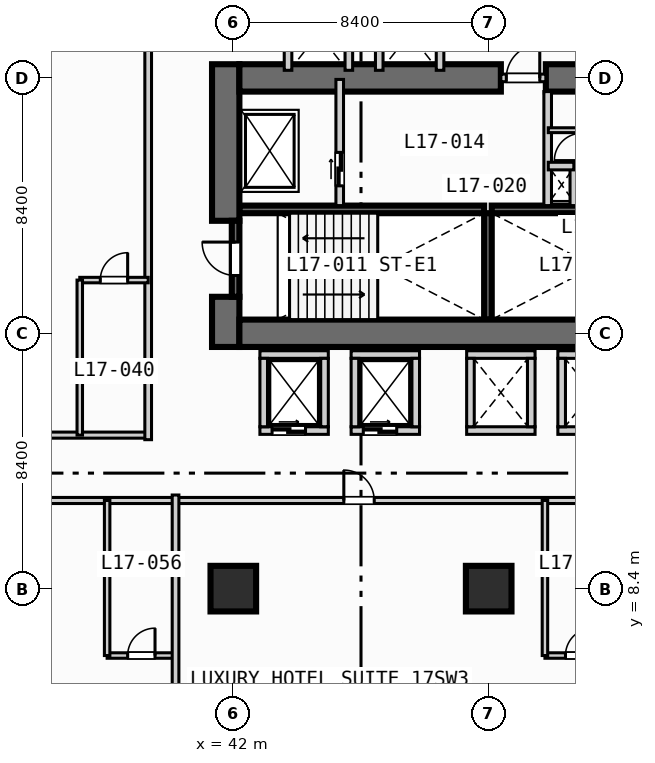
"""IFC4 building model, lengths in metres.
Left out: names, types, materials, properties, quantities, classifications, styles, units other than length and angle.
Written with IfcOpenShell. Run it as: python <this file> out.ifc"""

import sys

from ifc_helpers import new_model, si_unit, direction, frame, frame_2d, origin, origin_2d, place, context, subcontext, project, spatial, rectangle, extrude, element, fill, save


model = new_model("IFC4")
c1 = context("Model", 3, precision=1e-05, world=origin(), true_north=direction((0.0, 1.0)))
c2 = subcontext(c1, "Body", "Model", "MODEL_VIEW")
j1 = project(units=[si_unit("LENGTHUNIT", "METRE"), si_unit("PLANEANGLEUNIT", "RADIAN")], contexts=[c1])
p1 = place(None, origin())
s1 = spatial("IfcSite", under=j1, at=p1, CompositionType="ELEMENT")
p2 = place(p1, origin())
s2 = spatial("IfcBuilding", under=s1, at=p2, CompositionType="ELEMENT")
p3 = place(p2, frame((0.0, 0.0, 73.8)))
s3 = spatial("IfcBuildingStorey", under=s2, at=p3, CompositionType="ELEMENT", Elevation=73.8)
for number, where, z_axis, x_axis in (
    (1, (42.2, 20.875, 0.0), (0.0, 0.0, 1.0), (1.0, 0.0, 0.0)),
    (2, (50.5, 20.875, 0.0), (0.0, 0.0, 1.0), (1.0, 0.0, 0.0)),
):
    element("IfcWall", number, at=place(p3, frame(where, z_axis=z_axis, x_axis=x_axis)), inside=s3, PredefinedType="SOLIDWALL", context=c2, shape_type="SweptSolid", body=[
        extrude(rectangle(XDim=8.05, YDim=0.25, at=frame_2d((4.025, 0.0))), origin(), (0.0, 0.0, 1.0), 3.55),
    ])
p4 = place(p3, frame((50.375, 17.25, 0.0), z_axis=(0.0, 0.0, 1.0), x_axis=(0.0, 1.0, 0.0)))
e3 = element("IfcWall", 3, at=p4, inside=s3, PredefinedType="SOLIDWALL", context=c2, shape_type="SweptSolid", body=[
    extrude(rectangle(XDim=3.5, YDim=0.25, at=frame_2d((1.75, 0.0))), origin(), (0.0, 0.0, 1.0), 3.55),
])
p5 = place(p3, frame((41.75, 16.35, 0.0), z_axis=(0.0, 0.0, 1.0), x_axis=(0.0, 1.0, 0.0)))
e4 = element("IfcWall", 4, at=p5, inside=s3, PredefinedType="SHEAR", context=c2, shape_type="SweptSolid", body=[
    extrude(rectangle(XDim=1.65, YDim=0.9, at=frame_2d((0.825, 0.0))), origin(), (0.0, 0.0, 1.0), 3.55),
])
p6 = place(p3, frame((41.75, 20.5, 0.0), z_axis=(0.0, 0.0, 1.0), x_axis=(0.0, 1.0, 0.0)))
e5 = element("IfcWall", 5, at=p6, inside=s3, PredefinedType="SHEAR", context=c2, shape_type="SweptSolid", body=[
    extrude(rectangle(XDim=5.15, YDim=0.9, at=frame_2d((2.575, 0.0))), origin(), (0.0, 0.0, 1.0), 3.55),
])
p7 = place(p3, frame((42.2, 16.8, 0.0), z_axis=(0.0, 0.0, 1.0), x_axis=(1.0, 0.0, 0.0)))
e6 = element("IfcWall", 6, at=p7, inside=s3, PredefinedType="SHEAR", context=c2, shape_type="SweptSolid", body=[
    extrude(rectangle(XDim=16.35, YDim=0.9, at=frame_2d((8.175, 0.0))), origin(), (0.0, 0.0, 1.0), 3.55),
])
p8 = place(p3, frame((42.2, 25.2, 0.0), z_axis=(0.0, 0.0, 1.0), x_axis=(1.0, 0.0, 0.0)))
e7 = element("IfcWall", 7, at=p8, inside=s3, PredefinedType="SHEAR", context=c2, shape_type="SweptSolid", body=[
    extrude(rectangle(XDim=8.6, YDim=0.9, at=frame_2d((4.3, 0.0))), origin(), (0.0, 0.0, 1.0), 3.55),
])
p9 = place(p3, frame((52.28, 25.2, 0.0), z_axis=(0.0, 0.0, 1.0), x_axis=(1.0, 0.0, 0.0)))
e8 = element("IfcWall", 8, at=p9, inside=s3, PredefinedType="SHEAR", context=c2, shape_type="SweptSolid", body=[
    extrude(rectangle(XDim=1.27, YDim=0.9, at=frame_2d((0.635, 0.0))), origin(), (0.0, 0.0, 1.0), 3.55),
])
for number, where, z_axis, x_axis in (
    (9, (42.0, 8.4, 0.0), (0.0, 0.0, 1.0), (1.0, 0.0, 0.0)),
    (10, (50.4, 8.4, 0.0), (0.0, 0.0, 1.0), (1.0, 0.0, 0.0)),
):
    element("IfcColumn", number, at=place(p3, frame(where, z_axis=z_axis, x_axis=x_axis)), inside=s3, PredefinedType="COLUMN", context=c2, shape_type="SweptSolid", body=[
        extrude(rectangle(XDim=1.5, YDim=1.5, at=origin_2d()), origin(), (0.0, 0.0, 1.0), 3.8),
    ])
p10 = place(p3, frame((42.075, 18.0, 0.0), z_axis=(0.0, 0.0, 1.0), x_axis=(0.0, 1.0, 0.0)))
e11 = element("IfcWall", 11, at=p10, inside=s3, PredefinedType="SOLIDWALL", context=c2, shape_type="SweptSolid", body=[
    extrude(rectangle(XDim=2.5, YDim=0.25, at=frame_2d((1.25, 0.0))), origin(), (0.0, 0.0, 1.0), 3.55),
])
p11 = place(p10, frame((0.7, 0.0, 0.0)))
e12 = element("IfcOpeningElement", 12, at=p11, cuts=e11, PredefinedType="OPENING", context=c2, shape_type="SweptSolid", body=[
    extrude(rectangle(XDim=1.1, YDim=2.15, at=frame_2d((0.55, 1.075))), frame((0.0, 0.135, 0.0), z_axis=(0.0, -1.0, 0.0), x_axis=(1.0, 0.0, 0.0)), (0.0, 0.0, 1.0), 0.27),
])
p12 = place(p3, frame((45.5, 21.0, 0.0), z_axis=(0.0, 0.0, 1.0), x_axis=(0.0, 1.0, 0.0)))
e13 = element("IfcWall", 13, at=p12, inside=s3, PredefinedType="SOLIDWALL", context=c2, shape_type="SweptSolid", body=[
    extrude(rectangle(XDim=4.15, YDim=0.25, at=frame_2d((2.075, 0.0))), origin(), (0.0, 0.0, 1.0), 3.55),
])
p13 = place(p12, frame((0.65, 0.0, 0.0)))
e14 = element("IfcOpeningElement", 14, at=p13, cuts=e13, PredefinedType="OPENING", context=c2, shape_type="SweptSolid", body=[
    extrude(rectangle(XDim=1.1, YDim=2.15, at=frame_2d((0.55, 1.075))), frame((0.0, 0.135, 0.0), z_axis=(0.0, -1.0, 0.0), x_axis=(1.0, 0.0, 0.0)), (0.0, 0.0, 1.0), 0.27),
])
p14 = place(p3, frame((50.8, 25.2, 0.0), z_axis=(0.0, 0.0, 1.0), x_axis=(1.0, 0.0, 0.0)))
e15 = element("IfcWall", 15, at=p14, inside=s3, PredefinedType="SOLIDWALL", context=c2, shape_type="SweptSolid", body=[
    extrude(rectangle(XDim=1.48, YDim=0.25, at=frame_2d((0.74, 0.0))), origin(), (0.0, 0.0, 1.0), 3.55),
])
p15 = place(p14, frame((0.18, 0.0, 0.0)))
e16 = element("IfcOpeningElement", 16, at=p15, cuts=e15, PredefinedType="OPENING", context=c2, shape_type="SweptSolid", body=[
    extrude(rectangle(XDim=1.1, YDim=2.15, at=frame_2d((0.55, 1.075))), frame((0.0, 0.135, 0.0), z_axis=(0.0, -1.0, 0.0), x_axis=(1.0, 0.0, 0.0)), (0.0, 0.0, 1.0), 0.27),
])
p16 = place(p3, frame((52.34, 21.0, 0.0), z_axis=(0.0, 0.0, 1.0), x_axis=(0.0, 1.0, 0.0)))
e17 = element("IfcWall", 17, at=p16, inside=s3, PredefinedType="SOLIDWALL", context=c2, shape_type="SweptSolid", body=[
    extrude(rectangle(XDim=3.75, YDim=0.25, at=frame_2d((1.875, 0.0))), origin(), (0.0, 0.0, 1.0), 3.55),
])
p17 = place(p3, frame((53.2, 21.0, 0.0), z_axis=(0.0, 0.0, 1.0), x_axis=(0.0, 1.0, 0.0)))
e18 = element("IfcWall", 18, at=p17, inside=s3, PredefinedType="SOLIDWALL", context=c2, shape_type="SweptSolid", body=[
    extrude(rectangle(XDim=1.3, YDim=0.25, at=frame_2d((0.65, 0.0))), origin(), (0.0, 0.0, 1.0), 3.55),
])
p18 = place(p3, frame((52.36, 22.3, 0.0), z_axis=(0.0, 0.0, 1.0), x_axis=(1.0, 0.0, 0.0)))
e19 = element("IfcWall", 19, at=p18, inside=s3, PredefinedType="SOLIDWALL", context=c2, shape_type="SweptSolid", body=[
    extrude(rectangle(XDim=0.84, YDim=0.25, at=frame_2d((0.42, 0.0))), origin(), (0.0, 0.0, 1.0), 3.55),
])
p19 = place(p3, frame((52.36, 23.48, 0.0), z_axis=(0.0, 0.0, 1.0), x_axis=(1.0, 0.0, 0.0)))
e20 = element("IfcWall", 20, at=p19, inside=s3, PredefinedType="PARTITIONING", context=c2, shape_type="SweptSolid", body=[
    extrude(rectangle(XDim=1.1, YDim=0.16, at=frame_2d((0.55, 0.0))), origin(), (0.0, 0.0, 1.0), 3.55),
])
p20 = place(p3, frame((42.875, 13.6, 0.0), z_axis=(0.0, 0.0, 1.0), x_axis=(1.0, 0.0, 0.0)))
e21 = element("IfcWall", 21, at=p20, inside=s3, PredefinedType="SOLIDWALL", context=c2, shape_type="SweptSolid", body=[
    extrude(rectangle(XDim=2.25, YDim=0.25, at=frame_2d((1.125, 0.0))), origin(), (0.0, 0.0, 1.0), 3.55),
])
p21 = place(p20, frame((0.4, 0.0, 0.0)))
e22 = element("IfcOpeningElement", 22, at=p21, cuts=e21, PredefinedType="OPENING", context=c2, shape_type="SweptSolid", body=[
    extrude(rectangle(XDim=1.1, YDim=2.15, at=frame_2d((0.55, 1.075))), frame((0.0, 0.135, 0.0), z_axis=(0.0, -1.0, 0.0), x_axis=(1.0, 0.0, 0.0)), (0.0, 0.0, 1.0), 0.27),
])
for number, where, z_axis, x_axis in (
    (23, (42.875, 16.1, 0.0), (0.0, 0.0, 1.0), (1.0, 0.0, 0.0)),
    (24, (43.0, 13.725, 0.0), (0.0, 0.0, 1.0), (0.0, 1.0, 0.0)),
    (25, (45.0, 13.725, 0.0), (0.0, 0.0, 1.0), (0.0, 1.0, 0.0)),
):
    element("IfcWall", number, at=place(p3, frame(where, z_axis=z_axis, x_axis=x_axis)), inside=s3, PredefinedType="SOLIDWALL", context=c2, shape_type="SweptSolid", body=[
        extrude(rectangle(XDim=2.25, YDim=0.25, at=frame_2d((1.125, 0.0))), origin(), (0.0, 0.0, 1.0), 3.55),
    ])
p22 = place(p3, frame((45.875, 13.6, 0.0), z_axis=(0.0, 0.0, 1.0), x_axis=(1.0, 0.0, 0.0)))
e26 = element("IfcWall", 26, at=p22, inside=s3, PredefinedType="SOLIDWALL", context=c2, shape_type="SweptSolid", body=[
    extrude(rectangle(XDim=2.25, YDim=0.25, at=frame_2d((1.125, 0.0))), origin(), (0.0, 0.0, 1.0), 3.55),
])
p23 = place(p22, frame((0.4, 0.0, 0.0)))
e27 = element("IfcOpeningElement", 27, at=p23, cuts=e26, PredefinedType="OPENING", context=c2, shape_type="SweptSolid", body=[
    extrude(rectangle(XDim=1.1, YDim=2.15, at=frame_2d((0.55, 1.075))), frame((0.0, 0.135, 0.0), z_axis=(0.0, -1.0, 0.0), x_axis=(1.0, 0.0, 0.0)), (0.0, 0.0, 1.0), 0.27),
])
for number, where, z_axis, x_axis in (
    (28, (45.875, 16.1, 0.0), (0.0, 0.0, 1.0), (1.0, 0.0, 0.0)),
    (29, (46.0, 13.725, 0.0), (0.0, 0.0, 1.0), (0.0, 1.0, 0.0)),
    (30, (48.0, 13.725, 0.0), (0.0, 0.0, 1.0), (0.0, 1.0, 0.0)),
    (31, (49.675, 13.6, 0.0), (0.0, 0.0, 1.0), (1.0, 0.0, 0.0)),
    (32, (49.675, 16.1, 0.0), (0.0, 0.0, 1.0), (1.0, 0.0, 0.0)),
    (33, (49.8, 13.725, 0.0), (0.0, 0.0, 1.0), (0.0, 1.0, 0.0)),
    (34, (51.8, 13.725, 0.0), (0.0, 0.0, 1.0), (0.0, 1.0, 0.0)),
    (35, (52.675, 13.6, 0.0), (0.0, 0.0, 1.0), (1.0, 0.0, 0.0)),
    (36, (52.675, 16.1, 0.0), (0.0, 0.0, 1.0), (1.0, 0.0, 0.0)),
    (37, (52.8, 13.725, 0.0), (0.0, 0.0, 1.0), (0.0, 1.0, 0.0)),
):
    element("IfcWall", number, at=place(p3, frame(where, z_axis=z_axis, x_axis=x_axis)), inside=s3, PredefinedType="SOLIDWALL", context=c2, shape_type="SweptSolid", body=[
        extrude(rectangle(XDim=2.25, YDim=0.25, at=frame_2d((1.125, 0.0))), origin(), (0.0, 0.0, 1.0), 3.55),
    ])
for number, where, z_axis, x_axis in (
    (38, (43.8, 25.45, 0.0), (0.0, 0.0, 1.0), (0.0, 1.0, 0.0)),
    (39, (45.8, 25.45, 0.0), (0.0, 0.0, 1.0), (0.0, 1.0, 0.0)),
    (40, (46.8, 25.45, 0.0), (0.0, 0.0, 1.0), (0.0, 1.0, 0.0)),
    (41, (48.8, 25.45, 0.0), (0.0, 0.0, 1.0), (0.0, 1.0, 0.0)),
):
    element("IfcWall", number, at=place(p3, frame(where, z_axis=z_axis, x_axis=x_axis)), inside=s3, PredefinedType="SOLIDWALL", context=c2, shape_type="SweptSolid", body=[
        extrude(rectangle(XDim=2.325, YDim=0.25, at=frame_2d((1.163, 0.0))), origin(), (0.0, 0.0, 1.0), 3.55),
    ])
p24 = place(p3, frame((25.6, 13.45, 0.0), z_axis=(0.0, 0.0, 1.0), x_axis=(1.0, 0.0, 0.0)))
e42 = element("IfcWall", 42, at=p24, inside=s3, PredefinedType="PARTITIONING", context=c2, shape_type="SweptSolid", body=[
    extrude(rectangle(XDim=13.6, YDim=0.2, at=frame_2d((6.8, 0.0))), origin(), (0.0, 0.0, 1.0), 3.55),
])
p25 = place(p24, frame((1.735, 0.0, 0.0)))
e43 = element("IfcOpeningElement", 43, at=p25, cuts=e42, PredefinedType="OPENING", context=c2, shape_type="SweptSolid", body=[
    extrude(rectangle(XDim=1.0, YDim=2.15, at=frame_2d((0.5, 1.075))), frame((0.0, 0.11, 0.0), z_axis=(0.0, -1.0, 0.0), x_axis=(1.0, 0.0, 0.0)), (0.0, 0.0, 1.0), 0.22),
])
p26 = place(p24, frame((8.535, 0.0, 0.0)))
e44 = element("IfcOpeningElement", 44, at=p26, cuts=e42, PredefinedType="OPENING", context=c2, shape_type="SweptSolid", body=[
    extrude(rectangle(XDim=1.0, YDim=2.15, at=frame_2d((0.5, 1.075))), frame((0.0, 0.11, 0.0), z_axis=(0.0, -1.0, 0.0), x_axis=(1.0, 0.0, 0.0)), (0.0, 0.0, 1.0), 0.22),
])
p27 = place(p3, frame((39.2, 13.3, 0.0), z_axis=(0.0, 0.0, 1.0), x_axis=(0.0, 1.0, 0.0)))
e45 = element("IfcWall", 45, at=p27, inside=s3, PredefinedType="PARTITIONING", context=c2, shape_type="SweptSolid", body=[
    extrude(rectangle(XDim=20.13, YDim=0.22, at=frame_2d((10.065, 0.0))), origin(), (0.0, 0.0, 1.0), 3.55),
])
p28 = place(p3, frame((36.95, 18.55, 0.0), z_axis=(0.0, 0.0, 1.0), x_axis=(1.0, 0.0, 0.0)))
e46 = element("IfcWall", 46, at=p28, inside=s3, PredefinedType="PLUMBINGWALL", context=c2, shape_type="SweptSolid", body=[
    extrude(rectangle(XDim=2.25, YDim=0.18, at=frame_2d((1.125, 0.0))), origin(), (0.0, 0.0, 1.0), 3.55),
])
p29 = place(p28, frame((0.675, 0.0, 0.0)))
e47 = element("IfcOpeningElement", 47, at=p29, cuts=e46, PredefinedType="OPENING", context=c2, shape_type="SweptSolid", body=[
    extrude(rectangle(XDim=0.9, YDim=2.1, at=frame_2d((0.45, 1.05))), frame((0.0, 0.1, 0.0), z_axis=(0.0, -1.0, 0.0), x_axis=(1.0, 0.0, 0.0)), (0.0, 0.0, 1.0), 0.2),
])
p30 = place(p3, frame((36.95, 13.45, 0.0), z_axis=(0.0, 0.0, 1.0), x_axis=(0.0, 1.0, 0.0)))
e48 = element("IfcWall", 48, at=p30, inside=s3, PredefinedType="PLUMBINGWALL", context=c2, shape_type="SweptSolid", body=[
    extrude(rectangle(XDim=5.1, YDim=0.18, at=frame_2d((2.55, 0.0))), origin(), (0.0, 0.0, 1.0), 3.55),
])
p31 = place(p3, frame((13.7, 11.3, 0.0), z_axis=(0.0, 0.0, 1.0), x_axis=(1.0, 0.0, 0.0)))
e49 = element("IfcWall", 49, at=p31, inside=s3, PredefinedType="PARTITIONING", context=c2, shape_type="SweptSolid", body=[
    extrude(rectangle(XDim=50.1, YDim=0.2, at=frame_2d((25.05, 0.0))), origin(), (0.0, 0.0, 1.0), 3.55),
])
p32 = place(p31, frame((3.61, 0.0, 0.0)))
e50 = element("IfcOpeningElement", 50, at=p32, cuts=e49, PredefinedType="OPENING", context=c2, shape_type="SweptSolid", body=[
    extrude(rectangle(XDim=1.0, YDim=2.15, at=frame_2d((0.5, 1.075))), frame((0.0, 0.11, 0.0), z_axis=(0.0, -1.0, 0.0), x_axis=(1.0, 0.0, 0.0)), (0.0, 0.0, 1.0), 0.22),
])
p33 = place(p31, frame((16.81, 0.0, 0.0)))
e51 = element("IfcOpeningElement", 51, at=p33, cuts=e49, PredefinedType="OPENING", context=c2, shape_type="SweptSolid", body=[
    extrude(rectangle(XDim=1.0, YDim=2.15, at=frame_2d((0.5, 1.075))), frame((0.0, 0.11, 0.0), z_axis=(0.0, -1.0, 0.0), x_axis=(1.0, 0.0, 0.0)), (0.0, 0.0, 1.0), 0.22),
])
p34 = place(p31, frame((31.935, 0.0, 0.0)))
e52 = element("IfcOpeningElement", 52, at=p34, cuts=e49, PredefinedType="OPENING", context=c2, shape_type="SweptSolid", body=[
    extrude(rectangle(XDim=1.0, YDim=2.15, at=frame_2d((0.5, 1.075))), frame((0.0, 0.11, 0.0), z_axis=(0.0, -1.0, 0.0), x_axis=(1.0, 0.0, 0.0)), (0.0, 0.0, 1.0), 0.22),
])
p35 = place(p31, frame((43.785, 0.0, 0.0)))
e53 = element("IfcOpeningElement", 53, at=p35, cuts=e49, PredefinedType="OPENING", context=c2, shape_type="SweptSolid", body=[
    extrude(rectangle(XDim=1.0, YDim=2.15, at=frame_2d((0.5, 1.075))), frame((0.0, 0.11, 0.0), z_axis=(0.0, -1.0, 0.0), x_axis=(1.0, 0.0, 0.0)), (0.0, 0.0, 1.0), 0.22),
])
p36 = place(p3, frame((37.85, 6.2, 0.0), z_axis=(0.0, 0.0, 1.0), x_axis=(1.0, 0.0, 0.0)))
e54 = element("IfcWall", 54, at=p36, inside=s3, PredefinedType="PLUMBINGWALL", context=c2, shape_type="SweptSolid", body=[
    extrude(rectangle(XDim=2.25, YDim=0.18, at=frame_2d((1.125, 0.0))), origin(), (0.0, 0.0, 1.0), 3.55),
])
p37 = place(p36, frame((0.675, 0.0, 0.0)))
e55 = element("IfcOpeningElement", 55, at=p37, cuts=e54, PredefinedType="OPENING", context=c2, shape_type="SweptSolid", body=[
    extrude(rectangle(XDim=0.9, YDim=2.1, at=frame_2d((0.45, 1.05))), frame((0.0, 0.1, 0.0), z_axis=(0.0, -1.0, 0.0), x_axis=(1.0, 0.0, 0.0)), (0.0, 0.0, 1.0), 0.2),
])
p38 = place(p3, frame((37.85, 6.2, 0.0), z_axis=(0.0, 0.0, 1.0), x_axis=(0.0, 1.0, 0.0)))
e56 = element("IfcWall", 56, at=p38, inside=s3, PredefinedType="PLUMBINGWALL", context=c2, shape_type="SweptSolid", body=[
    extrude(rectangle(XDim=5.1, YDim=0.18, at=frame_2d((2.55, 0.0))), origin(), (0.0, 0.0, 1.0), 3.55),
])
p39 = place(p3, frame((40.1, 0.2, 0.0), z_axis=(0.0, 0.0, 1.0), x_axis=(0.0, 1.0, 0.0)))
e57 = element("IfcWall", 57, at=p39, inside=s3, PredefinedType="PARTITIONING", context=c2, shape_type="SweptSolid", body=[
    extrude(rectangle(XDim=11.28, YDim=0.22, at=frame_2d((5.64, 0.0))), origin(), (0.0, 0.0, 1.0), 3.55),
])
p40 = place(p3, frame((52.25, 6.2, 0.0), z_axis=(0.0, 0.0, 1.0), x_axis=(1.0, 0.0, 0.0)))
e58 = element("IfcWall", 58, at=p40, inside=s3, PredefinedType="PLUMBINGWALL", context=c2, shape_type="SweptSolid", body=[
    extrude(rectangle(XDim=2.25, YDim=0.18, at=frame_2d((1.125, 0.0))), origin(), (0.0, 0.0, 1.0), 3.55),
])
p41 = place(p40, frame((0.675, 0.0, 0.0)))
e59 = element("IfcOpeningElement", 59, at=p41, cuts=e58, PredefinedType="OPENING", context=c2, shape_type="SweptSolid", body=[
    extrude(rectangle(XDim=0.9, YDim=2.1, at=frame_2d((0.45, 1.05))), frame((0.0, 0.1, 0.0), z_axis=(0.0, -1.0, 0.0), x_axis=(1.0, 0.0, 0.0)), (0.0, 0.0, 1.0), 0.2),
])
p42 = place(p3, frame((52.25, 6.2, 0.0), z_axis=(0.0, 0.0, 1.0), x_axis=(0.0, 1.0, 0.0)))
e60 = element("IfcWall", 60, at=p42, inside=s3, PredefinedType="PLUMBINGWALL", context=c2, shape_type="SweptSolid", body=[
    extrude(rectangle(XDim=5.1, YDim=0.18, at=frame_2d((2.55, 0.0))), origin(), (0.0, 0.0, 1.0), 3.55),
])
p43 = place(p11, origin())
e61 = element("IfcDoor", 61, at=p43, inside=s3, OperationType="SINGLE_SWING_RIGHT", PredefinedType="DOOR", context=c2, shape_type="SweptSolid", body=[
    extrude(rectangle(XDim=1.1, YDim=2.15, at=frame_2d((0.55, 1.075))), frame((0.0, 0.025, 0.0), z_axis=(0.0, -1.0, 0.0), x_axis=(1.0, 0.0, 0.0)), (0.0, 0.0, 1.0), 0.05),
])
fill(e12, e61)
p44 = place(p13, origin())
e62 = element("IfcDoor", 62, at=p44, inside=s3, OperationType="SLIDING_TO_LEFT", PredefinedType="DOOR", context=c2, shape_type="SweptSolid", body=[
    extrude(rectangle(XDim=1.1, YDim=2.15, at=frame_2d((0.55, 1.075))), frame((0.0, 0.025, 0.0), z_axis=(0.0, -1.0, 0.0), x_axis=(1.0, 0.0, 0.0)), (0.0, 0.0, 1.0), 0.05),
])
fill(e14, e62)
p45 = place(p15, origin())
e63 = element("IfcDoor", 63, at=p45, inside=s3, OperationType="SINGLE_SWING_RIGHT", PredefinedType="DOOR", context=c2, shape_type="SweptSolid", body=[
    extrude(rectangle(XDim=1.1, YDim=2.15, at=frame_2d((0.55, 1.075))), frame((0.0, 0.025, 0.0), z_axis=(0.0, -1.0, 0.0), x_axis=(1.0, 0.0, 0.0)), (0.0, 0.0, 1.0), 0.05),
])
fill(e16, e63)
p46 = place(p21, origin())
e64 = element("IfcDoor", 64, at=p46, inside=s3, OperationType="SLIDING_TO_LEFT", PredefinedType="DOOR", context=c2, shape_type="SweptSolid", body=[
    extrude(rectangle(XDim=1.1, YDim=2.15, at=frame_2d((0.55, 1.075))), frame((0.0, 0.025, 0.0), z_axis=(0.0, -1.0, 0.0), x_axis=(1.0, 0.0, 0.0)), (0.0, 0.0, 1.0), 0.05),
])
fill(e22, e64)
p47 = place(p23, origin())
e65 = element("IfcDoor", 65, at=p47, inside=s3, OperationType="SLIDING_TO_LEFT", PredefinedType="DOOR", context=c2, shape_type="SweptSolid", body=[
    extrude(rectangle(XDim=1.1, YDim=2.15, at=frame_2d((0.55, 1.075))), frame((0.0, 0.025, 0.0), z_axis=(0.0, -1.0, 0.0), x_axis=(1.0, 0.0, 0.0)), (0.0, 0.0, 1.0), 0.05),
])
fill(e27, e65)
p48 = place(p29, origin())
e66 = element("IfcDoor", 66, at=p48, inside=s3, OperationType="SINGLE_SWING_RIGHT", PredefinedType="DOOR", context=c2, shape_type="SweptSolid", body=[
    extrude(rectangle(XDim=0.9, YDim=2.1, at=frame_2d((0.45, 1.05))), frame((0.0, 0.025, 0.0), z_axis=(0.0, -1.0, 0.0), x_axis=(1.0, 0.0, 0.0)), (0.0, 0.0, 1.0), 0.05),
])
fill(e47, e66)
p49 = place(p34, origin())
e67 = element("IfcDoor", 67, at=p49, inside=s3, OperationType="SINGLE_SWING_LEFT", PredefinedType="DOOR", context=c2, shape_type="SweptSolid", body=[
    extrude(rectangle(XDim=1.0, YDim=2.15, at=frame_2d((0.5, 1.075))), frame((0.0, 0.025, 0.0), z_axis=(0.0, -1.0, 0.0), x_axis=(1.0, 0.0, 0.0)), (0.0, 0.0, 1.0), 0.05),
])
fill(e52, e67)
p50 = place(p37, origin())
e68 = element("IfcDoor", 68, at=p50, inside=s3, OperationType="SINGLE_SWING_RIGHT", PredefinedType="DOOR", context=c2, shape_type="SweptSolid", body=[
    extrude(rectangle(XDim=0.9, YDim=2.1, at=frame_2d((0.45, 1.05))), frame((0.0, 0.025, 0.0), z_axis=(0.0, -1.0, 0.0), x_axis=(1.0, 0.0, 0.0)), (0.0, 0.0, 1.0), 0.05),
])
fill(e55, e68)
p51 = place(p41, origin())
e69 = element("IfcDoor", 69, at=p51, inside=s3, OperationType="SINGLE_SWING_RIGHT", PredefinedType="DOOR", context=c2, shape_type="SweptSolid", body=[
    extrude(rectangle(XDim=0.9, YDim=2.1, at=frame_2d((0.45, 1.05))), frame((0.0, 0.025, 0.0), z_axis=(0.0, -1.0, 0.0), x_axis=(1.0, 0.0, 0.0)), (0.0, 0.0, 1.0), 0.05),
])
fill(e59, e69)
save(model, sys.argv[1])
